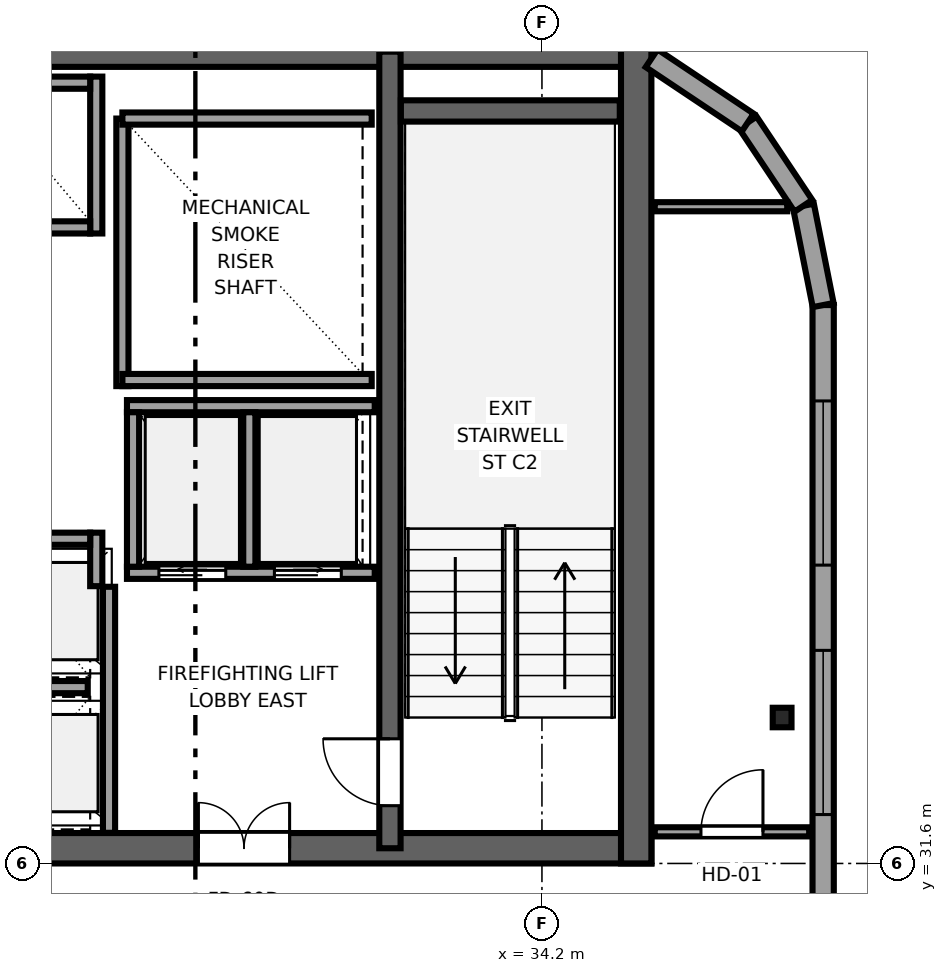
"""IFC4 building model, lengths in metres.
Left out: names, types, materials, properties, quantities, classifications, styles, units other than length and angle.
Written with IfcOpenShell. Run it as: python <this file> out.ifc"""

import sys

from ifc_helpers import new_model, si_unit, direction, frame, frame_2d, origin, origin_2d, place, context, subcontext, project, spatial, rectangle, i_section, extrude, source, transform, mapped, element, fill, save


model = new_model("IFC4")
c1 = context("Model", 3, precision=1e-05, world=origin(), true_north=direction((0.0, 1.0)))
c2 = subcontext(c1, "Body", "Model", "MODEL_VIEW")
j1 = project(units=[si_unit("LENGTHUNIT", "METRE"), si_unit("PLANEANGLEUNIT", "RADIAN")], contexts=[c1])
p1 = place(None, origin())
s1 = spatial("IfcSite", under=j1, at=p1, CompositionType="ELEMENT")
p2 = place(p1, origin())
s2 = spatial("IfcBuilding", under=s1, at=p2, CompositionType="ELEMENT")
p3 = place(p2, frame((0.0, 0.0, 252.3)))
s3 = spatial("IfcBuildingStorey", under=s2, at=p3, CompositionType="ELEMENT", Elevation=252.3)
p4 = place(p3, frame((10.0, 31.85, 0.0), z_axis=(0.0, 0.0, 1.0), x_axis=(1.0, 0.0, 0.0)))
e1 = element("IfcWall", 1, at=p4, inside=s3, PredefinedType="SHEAR", context=c2, shape_type="SweptSolid", body=[
    extrude(rectangle(XDim=26.0, YDim=0.5, at=frame_2d((13.0, 0.0))), origin(), (0.0, 0.0, 1.0), 3.55),
])
p5 = place(p4, frame((7.45, 0.0, 0.0), z_axis=(0.0, 0.0, 1.0), x_axis=(-1.0, 0.0, 0.0)))
e2 = element("IfcOpeningElement", 2, at=p5, cuts=e1, PredefinedType="OPENING", context=c2, shape_type="SweptSolid", body=[
    extrude(rectangle(XDim=1.5, YDim=2.04, at=frame_2d((0.75, 1.02))), frame((0.0, 0.26, 0.0), z_axis=(0.0, -1.0, 0.0), x_axis=(1.0, 0.0, 0.0)), (0.0, 0.0, 1.0), 0.52),
])
p6 = place(p4, frame((13.75, 0.0, 0.0), z_axis=(0.0, 0.0, 1.0), x_axis=(-1.0, 0.0, 0.0)))
e3 = element("IfcOpeningElement", 3, at=p6, cuts=e1, PredefinedType="OPENING", context=c2, shape_type="SweptSolid", body=[
    extrude(rectangle(XDim=1.5, YDim=2.04, at=frame_2d((0.75, 1.02))), frame((0.0, 0.26, 0.0), z_axis=(0.0, -1.0, 0.0), x_axis=(1.0, 0.0, 0.0)), (0.0, 0.0, 1.0), 0.52),
])
p7 = place(p4, frame((20.05, 0.0, 0.0), z_axis=(0.0, 0.0, 1.0), x_axis=(-1.0, 0.0, 0.0)))
e4 = element("IfcOpeningElement", 4, at=p7, cuts=e1, PredefinedType="OPENING", context=c2, shape_type="SweptSolid", body=[
    extrude(rectangle(XDim=1.5, YDim=2.04, at=frame_2d((0.75, 1.02))), frame((0.0, 0.26, 0.0), z_axis=(0.0, -1.0, 0.0), x_axis=(1.0, 0.0, 0.0)), (0.0, 0.0, 1.0), 0.52),
])
p8 = place(p3, frame((10.0, 44.95, 0.0), z_axis=(0.0, 0.0, 1.0), x_axis=(1.0, 0.0, 0.0)))
e5 = element("IfcWall", 5, at=p8, inside=s3, PredefinedType="SHEAR", context=c2, shape_type="SweptSolid", body=[
    extrude(rectangle(XDim=26.0, YDim=0.5, at=frame_2d((13.0, 0.0))), origin(), (0.0, 0.0, 1.0), 3.55),
])
p9 = place(p3, frame((35.75, 31.6, 0.0), z_axis=(0.0, 0.0, 1.0), x_axis=(0.0, 1.0, 0.0)))
e6 = element("IfcWall", 6, at=p9, inside=s3, PredefinedType="SHEAR", context=c2, shape_type="SweptSolid", body=[
    extrude(rectangle(XDim=13.6, YDim=0.5, at=frame_2d((6.8, 0.0))), origin(), (0.0, 0.0, 1.0), 3.55),
])
p10 = place(p3, frame((31.7, 31.85, 0.0), z_axis=(0.0, 0.0, 1.0), x_axis=(0.0, 1.0, 0.0)))
e7 = element("IfcWall", 7, at=p10, inside=s3, PredefinedType="SHEAR", context=c2, shape_type="SweptSolid", body=[
    extrude(rectangle(XDim=13.1, YDim=0.35, at=frame_2d((6.55, 0.0))), origin(), (0.0, 0.0, 1.0), 3.55),
])
p11 = place(p10, frame((1.8, 0.0, 0.0), z_axis=(0.0, 0.0, 1.0), x_axis=(-1.0, 0.0, 0.0)))
e8 = element("IfcOpeningElement", 8, at=p11, cuts=e7, PredefinedType="OPENING", context=c2, shape_type="SweptSolid", body=[
    extrude(rectangle(XDim=1.1, YDim=2.12, at=frame_2d((0.55, 1.06))), frame((0.0, 0.185, 0.0), z_axis=(0.0, -1.0, 0.0), x_axis=(1.0, 0.0, 0.0)), (0.0, 0.0, 1.0), 0.37),
])
p12 = place(p3, frame((31.88, 43.975, 0.0), z_axis=(0.0, 0.0, 1.0), x_axis=(1.0, 0.0, 0.0)))
e9 = element("IfcWall", 9, at=p12, inside=s3, PredefinedType="SHEAR", context=c2, shape_type="SweptSolid", body=[
    extrude(rectangle(XDim=3.6, YDim=0.35, at=frame_2d((1.8, 0.0))), origin(), (0.0, 0.0, 1.0), 3.55),
])
m1 = source(origin(), c2, "Body", "SweptSolid", [
    extrude(i_section(OverallWidth=0.309, OverallDepth=0.321, WebThickness=0.014, FlangeThickness=0.022, FilletRadius=0.017, at=origin_2d()), origin(), (0.0, 0.0, 1.0), 3.55),
])
p13 = place(p3, frame((38.15, 34.0, 0.0), z_axis=(0.0, 0.0, 1.0), x_axis=(1.0, 0.0, 0.0)))
e10 = element("IfcColumn", 10, at=p13, inside=s3, PredefinedType="COLUMN", context=c2, shape_type="MappedRepresentation", body=[
    mapped(m1, transform((0.0, 0.0, 0.0), x_axis=(1.0, 0.0, 0.0), y_axis=(0.0, 1.0, 0.0), z_axis=(0.0, 0.0, 1.0), scale=1.0)),
])
p14 = place(p3, frame((38.825, 7.017, 0.0), z_axis=(0.0, 0.0, 1.0), x_axis=(0.0, 1.0, 0.0)))
e11 = element("IfcWall", 11, at=p14, inside=s3, PredefinedType="SOLIDWALL", context=c2, shape_type="SweptSolid", body=[
    extrude(rectangle(XDim=33.766, YDim=0.35, at=frame_2d((16.883, 0.0))), origin(), (0.0, 0.0, 1.0), 3.37),
])
p15 = place(p14, frame((10.881, 0.0, 0.68)))
e12 = element("IfcOpeningElement", 12, at=p15, cuts=e11, PredefinedType="OPENING", context=c2, shape_type="SweptSolid", body=[
    extrude(rectangle(XDim=2.7, YDim=1.95, at=frame_2d((1.35, 0.975))), frame((0.0, 0.185, 0.0), z_axis=(0.0, -1.0, 0.0), x_axis=(1.0, 0.0, 0.0)), (0.0, 0.0, 1.0), 0.37),
])
p16 = place(p14, frame((15.533, 0.0, 0.68)))
e13 = element("IfcOpeningElement", 13, at=p16, cuts=e11, PredefinedType="OPENING", context=c2, shape_type="SweptSolid", body=[
    extrude(rectangle(XDim=2.7, YDim=1.95, at=frame_2d((1.35, 0.975))), frame((0.0, 0.185, 0.0), z_axis=(0.0, -1.0, 0.0), x_axis=(1.0, 0.0, 0.0)), (0.0, 0.0, 1.0), 0.37),
])
p17 = place(p14, frame((19.635, 0.0, 0.68)))
e14 = element("IfcOpeningElement", 14, at=p17, cuts=e11, PredefinedType="OPENING", context=c2, shape_type="SweptSolid", body=[
    extrude(rectangle(XDim=2.7, YDim=1.95, at=frame_2d((1.35, 0.975))), frame((0.0, 0.185, 0.0), z_axis=(0.0, -1.0, 0.0), x_axis=(1.0, 0.0, 0.0)), (0.0, 0.0, 1.0), 0.37),
])
p18 = place(p14, frame((25.387, 0.0, 0.68)))
e15 = element("IfcOpeningElement", 15, at=p18, cuts=e11, PredefinedType="OPENING", context=c2, shape_type="SweptSolid", body=[
    extrude(rectangle(XDim=2.7, YDim=1.95, at=frame_2d((1.35, 0.975))), frame((0.0, 0.185, 0.0), z_axis=(0.0, -1.0, 0.0), x_axis=(1.0, 0.0, 0.0)), (0.0, 0.0, 1.0), 0.37),
])
p19 = place(p14, frame((29.489, 0.0, 0.68)))
e16 = element("IfcOpeningElement", 16, at=p19, cuts=e11, PredefinedType="OPENING", context=c2, shape_type="SweptSolid", body=[
    extrude(rectangle(XDim=2.7, YDim=1.95, at=frame_2d((1.35, 0.975))), frame((0.0, 0.185, 0.0), z_axis=(0.0, -1.0, 0.0), x_axis=(1.0, 0.0, 0.0)), (0.0, 0.0, 1.0), 0.37),
])
p20 = place(p14, frame((0.686, 0.0, 0.62)))
e17 = element("IfcOpeningElement", 17, at=p20, cuts=e11, PredefinedType="OPENING", context=c2, shape_type="SweptSolid", body=[
    extrude(rectangle(XDim=1.5, YDim=1.55, at=frame_2d((0.75, 0.775))), frame((0.0, 0.185, 0.0), z_axis=(0.0, -1.0, 0.0), x_axis=(1.0, 0.0, 0.0)), (0.0, 0.0, 1.0), 0.37),
])
p21 = place(p14, frame((4.733, 0.0, 0.62)))
e18 = element("IfcOpeningElement", 18, at=p21, cuts=e11, PredefinedType="OPENING", context=c2, shape_type="SweptSolid", body=[
    extrude(rectangle(XDim=1.5, YDim=1.55, at=frame_2d((0.75, 0.775))), frame((0.0, 0.185, 0.0), z_axis=(0.0, -1.0, 0.0), x_axis=(1.0, 0.0, 0.0)), (0.0, 0.0, 1.0), 0.37),
])
p22 = place(p3, frame((38.825, 40.783, 0.0), z_axis=(0.0, 0.0, 1.0), x_axis=(-0.195044345786, 0.980794424524, 0.0)))
e19 = element("IfcWall", 19, at=p22, inside=s3, PredefinedType="SOLIDWALL", context=c2, shape_type="SweptSolid", body=[
    extrude(rectangle(XDim=1.665, YDim=0.35, at=frame_2d((0.833, 0.0))), origin(), (0.0, 0.0, 1.0), 3.37),
])
p23 = place(p3, frame((38.5, 42.416, 0.0), z_axis=(0.0, 0.0, 1.0), x_axis=(-0.555520825599, 0.831502623162, 0.0)))
e20 = element("IfcWall", 20, at=p23, inside=s3, PredefinedType="SOLIDWALL", context=c2, shape_type="SweptSolid", body=[
    extrude(rectangle(XDim=1.647, YDim=0.35, at=frame_2d((0.824, 0.0))), origin(), (0.0, 0.0, 1.0), 3.37),
])
p24 = place(p3, frame((37.585, 43.785, 0.0), z_axis=(0.0, 0.0, 1.0), x_axis=(-0.831516639465, 0.555499845448, 0.0)))
e21 = element("IfcWall", 21, at=p24, inside=s3, PredefinedType="SOLIDWALL", context=c2, shape_type="SweptSolid", body=[
    extrude(rectangle(XDim=1.902, YDim=0.35, at=frame_2d((0.951, 0.0))), origin(), (0.0, 0.0, 1.0), 3.37),
])
p25 = place(p3, frame((27.3, 39.45, 0.0), z_axis=(0.0, 0.0, 1.0), x_axis=(0.0, 1.0, 0.0)))
e22 = element("IfcWall", 22, at=p25, inside=s3, PredefinedType="SOLIDWALL", context=c2, shape_type="SweptSolid", body=[
    extrude(rectangle(XDim=4.4, YDim=0.2, at=frame_2d((2.2, 0.0))), origin(), (0.0, 0.0, 1.0), 3.37),
])
for number, where, z_axis, x_axis in (
    (23, (27.3, 39.55, 0.0), (0.0, 0.0, 1.0), (1.0, 0.0, 0.0)),
    (24, (27.3, 43.85, 0.0), (0.0, 0.0, 1.0), (1.0, 0.0, 0.0)),
):
    element("IfcWall", number, at=place(p3, frame(where, z_axis=z_axis, x_axis=x_axis)), inside=s3, PredefinedType="SOLIDWALL", context=c2, shape_type="SweptSolid", body=[
        extrude(rectangle(XDim=4.1, YDim=0.2, at=frame_2d((2.05, 0.0))), origin(), (0.0, 0.0, 1.0), 3.37),
    ])
p26 = place(p3, frame((27.08, 32.104, 0.0), z_axis=(0.0, 0.0, 1.0), x_axis=(0.0, 1.0, 0.0)))
e25 = element("IfcWall", 25, at=p26, inside=s3, PredefinedType="SOLIDWALL", context=c2, shape_type="SweptSolid", body=[
    extrude(rectangle(XDim=4.046, YDim=0.2, at=frame_2d((2.023, 0.0))), origin(), (0.0, 0.0, 1.0), 3.37),
])
p27 = place(p3, frame((27.375, 36.38, 0.0), z_axis=(0.0, 0.0, 1.0), x_axis=(1.0, 0.0, 0.0)))
e26 = element("IfcWall", 26, at=p27, inside=s3, PredefinedType="SOLIDWALL", context=c2, shape_type="SweptSolid", body=[
    extrude(rectangle(XDim=4.075, YDim=0.2, at=frame_2d((2.038, 0.0))), origin(), (0.0, 0.0, 1.0), 3.37),
])
p28 = place(p27, frame((0.525, 0.0, 0.0)))
e27 = element("IfcOpeningElement", 27, at=p28, cuts=e26, PredefinedType="OPENING", context=c2, shape_type="SweptSolid", body=[
    extrude(rectangle(XDim=1.1, YDim=2.12, at=frame_2d((0.55, 1.06))), frame((0.0, 0.11, 0.0), z_axis=(0.0, -1.0, 0.0), x_axis=(1.0, 0.0, 0.0)), (0.0, 0.0, 1.0), 0.22),
])
p29 = place(p27, frame((2.425, 0.0, 0.0)))
e28 = element("IfcOpeningElement", 28, at=p29, cuts=e26, PredefinedType="OPENING", context=c2, shape_type="SweptSolid", body=[
    extrude(rectangle(XDim=1.1, YDim=2.12, at=frame_2d((0.55, 1.06))), frame((0.0, 0.11, 0.0), z_axis=(0.0, -1.0, 0.0), x_axis=(1.0, 0.0, 0.0)), (0.0, 0.0, 1.0), 0.22),
])
p30 = place(p3, frame((27.375, 39.12, 0.0), z_axis=(0.0, 0.0, 1.0), x_axis=(1.0, 0.0, 0.0)))
e29 = element("IfcWall", 29, at=p30, inside=s3, PredefinedType="SOLIDWALL", context=c2, shape_type="SweptSolid", body=[
    extrude(rectangle(XDim=4.075, YDim=0.2, at=frame_2d((2.038, 0.0))), origin(), (0.0, 0.0, 1.0), 3.37),
])
for number, where, z_axis, x_axis in (
    (30, (27.475, 36.48, 0.0), (0.0, 0.0, 1.0), (0.0, 1.0, 0.0)),
    (31, (29.387, 36.48, 0.0), (0.0, 0.0, 1.0), (0.0, 1.0, 0.0)),
):
    element("IfcWall", number, at=place(p3, frame(where, z_axis=z_axis, x_axis=x_axis)), inside=s3, PredefinedType="SOLIDWALL", context=c2, shape_type="SweptSolid", body=[
        extrude(rectangle(XDim=2.54, YDim=0.2, at=frame_2d((1.27, 0.0))), origin(), (0.0, 0.0, 1.0), 3.37),
    ])
p31 = place(p3, frame((26.87, 36.16, 0.0), z_axis=(0.0, 0.0, 1.0), x_axis=(0.0, 1.0, 0.0)))
e32 = element("IfcWall", 32, at=p31, inside=s3, PredefinedType="SOLIDWALL", context=c2, shape_type="SweptSolid", body=[
    extrude(rectangle(XDim=0.88, YDim=0.2, at=frame_2d((0.44, 0.0))), origin(), (0.0, 0.0, 1.0), 3.37),
])
p32 = place(p3, frame((24.93, 36.94, 0.0), z_axis=(0.0, 0.0, 1.0), x_axis=(1.0, 0.0, 0.0)))
e33 = element("IfcWall", 33, at=p32, inside=s3, PredefinedType="SOLIDWALL", context=c2, shape_type="SweptSolid", body=[
    extrude(rectangle(XDim=1.84, YDim=0.2, at=frame_2d((0.92, 0.0))), origin(), (0.0, 0.0, 1.0), 3.37),
])
p33 = place(p3, frame((24.93, 34.5, 0.0), z_axis=(0.0, 0.0, 1.0), x_axis=(1.0, 0.0, 0.0)))
e34 = element("IfcWall", 34, at=p33, inside=s3, PredefinedType="SOLIDWALL", context=c2, shape_type="SweptSolid", body=[
    extrude(rectangle(XDim=1.8, YDim=0.2, at=frame_2d((0.9, 0.0))), origin(), (0.0, 0.0, 1.0), 3.37),
])
p34 = place(p3, frame((26.87, 41.96, 0.0), z_axis=(0.0, 0.0, 1.0), x_axis=(0.0, 1.0, 0.0)))
e35 = element("IfcWall", 35, at=p34, inside=s3, PredefinedType="SOLIDWALL", context=c2, shape_type="SweptSolid", body=[
    extrude(rectangle(XDim=2.58, YDim=0.2, at=frame_2d((1.29, 0.0))), origin(), (0.0, 0.0, 1.0), 3.37),
])
for number, where, z_axis, x_axis in (
    (36, (24.93, 42.06, 0.0), (0.0, 0.0, 1.0), (1.0, 0.0, 0.0)),
    (37, (24.93, 44.44, 0.0), (0.0, 0.0, 1.0), (1.0, 0.0, 0.0)),
):
    element("IfcWall", number, at=place(p3, frame(where, z_axis=z_axis, x_axis=x_axis)), inside=s3, PredefinedType="SOLIDWALL", context=c2, shape_type="SweptSolid", body=[
        extrude(rectangle(XDim=1.84, YDim=0.2, at=frame_2d((0.92, 0.0))), origin(), (0.0, 0.0, 1.0), 3.37),
    ])
p35 = place(p3, frame((36.055, 32.12, 0.0), z_axis=(0.0, 0.0, 1.0), x_axis=(1.0, 0.0, 0.0)))
e38 = element("IfcWall", 38, at=p35, inside=s3, PredefinedType="PARTITIONING", context=c2, shape_type="SweptSolid", body=[
    extrude(rectangle(XDim=2.54, YDim=0.15, at=frame_2d((1.27, 0.0))), origin(), (0.0, 0.0, 1.0), 3.37),
])
p36 = place(p35, frame((0.76, 0.0, 0.0)))
e39 = element("IfcOpeningElement", 39, at=p36, cuts=e38, PredefinedType="OPENING", context=c2, shape_type="SweptSolid", body=[
    extrude(rectangle(XDim=1.02, YDim=2.03, at=frame_2d((0.51, 1.015))), frame((0.0, 0.085, 0.0), z_axis=(0.0, -1.0, 0.0), x_axis=(1.0, 0.0, 0.0)), (0.0, 0.0, 1.0), 0.17),
])
p37 = place(p3, frame((36.055, 42.4, 0.0), z_axis=(0.0, 0.0, 1.0), x_axis=(1.0, 0.0, 0.0)))
e40 = element("IfcWall", 40, at=p37, inside=s3, PredefinedType="PARTITIONING", context=c2, shape_type="SweptSolid", body=[
    extrude(rectangle(XDim=2.179, YDim=0.15, at=frame_2d((1.089, 0.0))), origin(), (0.0, 0.0, 1.0), 3.37),
])
m2 = source(origin(), c2, "Body", "SweptSolid", [
    extrude(rectangle(XDim=2.7, YDim=1.95, at=frame_2d((1.35, 0.975))), frame((0.0, 0.09, 0.0), z_axis=(0.0, -1.0, 0.0), x_axis=(1.0, 0.0, 0.0)), (0.0, 0.0, 1.0), 0.06),
])
p38 = place(p18, origin())
e41 = element("IfcWindow", 41, at=p38, inside=s3, PartitioningType="TRIPLE_PANEL_HORIZONTAL", PredefinedType="WINDOW", context=c2, shape_type="MappedRepresentation", body=[
    mapped(m2, transform((0.0, 0.0, 0.0), x_axis=(1.0, 0.0, 0.0), y_axis=(0.0, 1.0, 0.0), z_axis=(0.0, 0.0, 1.0), scale=1.0)),
])
fill(e15, e41)
p39 = place(p19, origin())
e42 = element("IfcWindow", 42, at=p39, inside=s3, PartitioningType="TRIPLE_PANEL_HORIZONTAL", PredefinedType="WINDOW", context=c2, shape_type="MappedRepresentation", body=[
    mapped(m2, transform((0.0, 0.0, 0.0), x_axis=(1.0, 0.0, 0.0), y_axis=(0.0, 1.0, 0.0), z_axis=(0.0, 0.0, 1.0), scale=1.0)),
])
fill(e16, e42)
m3 = source(origin(), c2, "Body", "SweptSolid", [
    extrude(rectangle(XDim=1.1, YDim=2.12, at=frame_2d((0.55, 1.06))), frame((0.0, 0.025, 0.0), z_axis=(0.0, -1.0, 0.0), x_axis=(1.0, 0.0, 0.0)), (0.0, 0.0, 1.0), 0.05),
])
p40 = place(p11, origin())
e43 = element("IfcDoor", 43, at=p40, inside=s3, OperationType="SINGLE_SWING_RIGHT", PredefinedType="DOOR", context=c2, shape_type="MappedRepresentation", body=[
    mapped(m3, transform((0.0, 0.0, 0.0), x_axis=(1.0, 0.0, 0.0), y_axis=(0.0, 1.0, 0.0), z_axis=(0.0, 0.0, 1.0), scale=1.0)),
])
fill(e8, e43)
m4 = source(origin(), c2, "Body", "SweptSolid", [
    extrude(rectangle(XDim=1.5, YDim=2.04, at=frame_2d((0.75, 1.02))), frame((0.0, 0.025, 0.0), z_axis=(0.0, -1.0, 0.0), x_axis=(1.0, 0.0, 0.0)), (0.0, 0.0, 1.0), 0.05),
])
p41 = place(p7, origin())
e44 = element("IfcDoor", 44, at=p41, inside=s3, OperationType="DOUBLE_DOOR_SINGLE_SWING", PredefinedType="DOOR", context=c2, shape_type="MappedRepresentation", body=[
    mapped(m4, transform((0.0, 0.0, 0.0), x_axis=(1.0, 0.0, 0.0), y_axis=(0.0, 1.0, 0.0), z_axis=(0.0, 0.0, 1.0), scale=1.0)),
])
fill(e4, e44)
m5 = source(origin(), c2, "Body", "SweptSolid", [
    extrude(rectangle(XDim=1.1, YDim=2.12, at=frame_2d((0.55, 1.06))), frame((0.0, 0.025, 0.0), z_axis=(0.0, -1.0, 0.0), x_axis=(1.0, 0.0, 0.0)), (0.0, 0.0, 1.0), 0.05),
])
p42 = place(p28, origin())
e45 = element("IfcDoor", 45, at=p42, inside=s3, OperationType="SLIDING_TO_LEFT", PredefinedType="DOOR", context=c2, shape_type="MappedRepresentation", body=[
    mapped(m5, transform((0.0, 0.0, 0.0), x_axis=(1.0, 0.0, 0.0), y_axis=(0.0, 1.0, 0.0), z_axis=(0.0, 0.0, 1.0), scale=1.0)),
])
fill(e27, e45)
p43 = place(p29, origin())
e46 = element("IfcDoor", 46, at=p43, inside=s3, OperationType="SLIDING_TO_RIGHT", PredefinedType="DOOR", context=c2, shape_type="MappedRepresentation", body=[
    mapped(m5, transform((0.0, 0.0, 0.0), x_axis=(1.0, 0.0, 0.0), y_axis=(0.0, 1.0, 0.0), z_axis=(0.0, 0.0, 1.0), scale=1.0)),
])
fill(e28, e46)
m6 = source(origin(), c2, "Body", "SweptSolid", [
    extrude(rectangle(XDim=1.02, YDim=2.03, at=frame_2d((0.51, 1.015))), frame((0.0, 0.025, 0.0), z_axis=(0.0, -1.0, 0.0), x_axis=(1.0, 0.0, 0.0)), (0.0, 0.0, 1.0), 0.05),
])
p44 = place(p36, origin())
e47 = element("IfcDoor", 47, at=p44, inside=s3, OperationType="SINGLE_SWING_RIGHT", PredefinedType="DOOR", context=c2, shape_type="MappedRepresentation", body=[
    mapped(m6, transform((0.0, 0.0, 0.0), x_axis=(1.0, 0.0, 0.0), y_axis=(0.0, 1.0, 0.0), z_axis=(0.0, 0.0, 1.0), scale=1.0)),
])
fill(e39, e47)
save(model, sys.argv[1])
